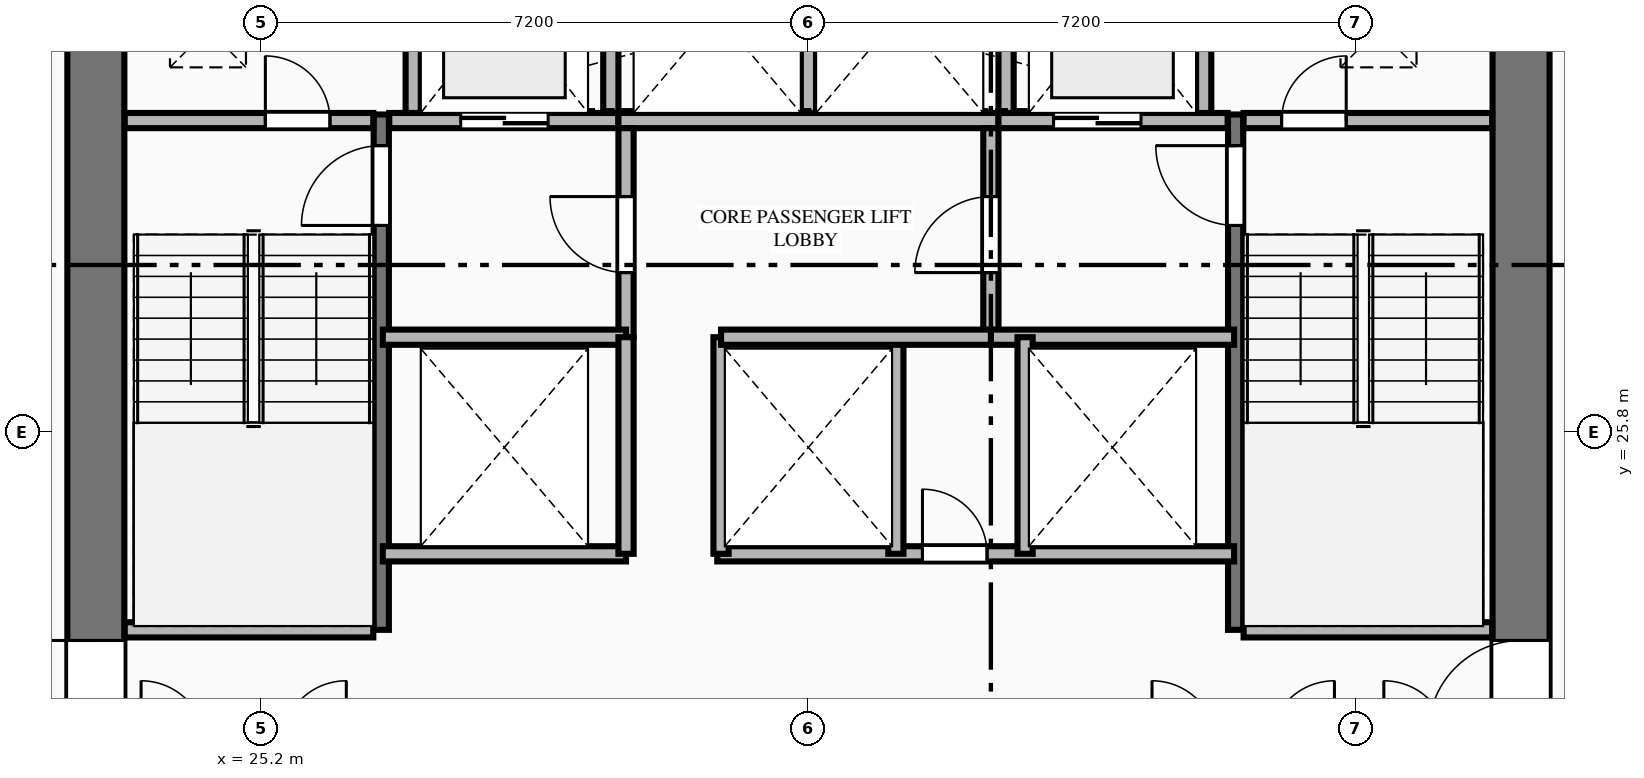
"""IFC4 building model, lengths in metres.
Left out: names, types, materials, properties, quantities, classifications, styles, units other than length and angle.
Written with IfcOpenShell. Run it as: python <this file> out.ifc"""

import sys

from ifc_helpers import new_model, si_unit, direction, frame, frame_2d, origin, place, context, subcontext, project, spatial, rectangle, extrude, element, fill, save


model = new_model("IFC4")
c1 = context("Model", 3, precision=1e-05, world=origin(), true_north=direction((0.0, 1.0)))
c2 = subcontext(c1, "Body", "Model", "MODEL_VIEW")
j1 = project(units=[si_unit("LENGTHUNIT", "METRE"), si_unit("PLANEANGLEUNIT", "RADIAN")], contexts=[c1])
p1 = place(None, origin())
s1 = spatial("IfcSite", under=j1, at=p1, CompositionType="ELEMENT")
p2 = place(p1, origin())
s2 = spatial("IfcBuilding", under=s1, at=p2, CompositionType="ELEMENT")
p3 = place(p2, frame((0.0, 0.0, 80.0)))
s3 = spatial("IfcBuildingStorey", under=s2, at=p3, CompositionType="ELEMENT", Elevation=80.0)
p4 = place(p3, frame((23.025, 18.9, 0.0), z_axis=(0.0, 0.0, 1.0), x_axis=(0.0, 1.0, 0.0)))
e1 = element("IfcWall", 1, at=p4, inside=s3, PredefinedType="SHEAR", context=c2, shape_type="SweptSolid", body=[
    extrude(rectangle(XDim=14.0, YDim=0.75, at=frame_2d((7.0, 0.0))), origin(), (0.0, 0.0, 1.0), 3.33),
])
p5 = place(p4, frame((2.94, 0.0, 0.0)))
e2 = element("IfcOpeningElement", 2, at=p5, cuts=e1, PredefinedType="OPENING", context=c2, shape_type="SweptSolid", body=[
    extrude(rectangle(XDim=1.22, YDim=2.25, at=frame_2d((0.61, 1.125))), frame((0.0, 0.385, 0.0), z_axis=(0.0, -1.0, 0.0), x_axis=(1.0, 0.0, 0.0)), (0.0, 0.0, 1.0), 0.77),
])
p6 = place(p3, frame((41.775, 18.9, 0.0), z_axis=(0.0, 0.0, 1.0), x_axis=(0.0, 1.0, 0.0)))
e3 = element("IfcWall", 3, at=p6, inside=s3, PredefinedType="SHEAR", context=c2, shape_type="SweptSolid", body=[
    extrude(rectangle(XDim=14.0, YDim=0.75, at=frame_2d((7.0, 0.0))), origin(), (0.0, 0.0, 1.0), 3.33),
])
p7 = place(p6, frame((2.94, 0.0, 0.0)))
e4 = element("IfcOpeningElement", 4, at=p7, cuts=e3, PredefinedType="OPENING", context=c2, shape_type="SweptSolid", body=[
    extrude(rectangle(XDim=1.22, YDim=2.25, at=frame_2d((0.61, 1.125))), frame((0.0, 0.385, 0.0), z_axis=(0.0, -1.0, 0.0), x_axis=(1.0, 0.0, 0.0)), (0.0, 0.0, 1.0), 0.77),
])
p8 = place(p3, frame((26.78, 23.2, 0.0), z_axis=(0.0, 0.0, 1.0), x_axis=(0.0, 1.0, 0.0)))
e5 = element("IfcWall", 5, at=p8, inside=s3, PredefinedType="SHEAR", context=c2, shape_type="SweptSolid", body=[
    extrude(rectangle(XDim=6.78, YDim=0.2, at=frame_2d((3.39, 0.0))), origin(), (0.0, 0.0, 1.0), 3.55),
])
p9 = place(p8, frame((5.32, 0.0, 0.0)))
e6 = element("IfcOpeningElement", 6, at=p9, cuts=e5, PredefinedType="OPENING", context=c2, shape_type="SweptSolid", body=[
    extrude(rectangle(XDim=1.05, YDim=2.15, at=frame_2d((0.525, 1.075))), frame((0.0, 0.11, 0.0), z_axis=(0.0, -1.0, 0.0), x_axis=(1.0, 0.0, 0.0)), (0.0, 0.0, 1.0), 0.22),
])
p10 = place(p3, frame((23.405, 23.2, 0.0), z_axis=(0.0, 0.0, 1.0), x_axis=(1.0, 0.0, 0.0)))
e7 = element("IfcWall", 7, at=p10, inside=s3, PredefinedType="PLUMBINGWALL", context=c2, shape_type="SweptSolid", body=[
    extrude(rectangle(XDim=3.27, YDim=0.2, at=frame_2d((1.635, 0.0))), origin(), (0.0, 0.0, 1.0), 3.33),
])
p11 = place(p3, frame((38.02, 23.2, 0.0), z_axis=(0.0, 0.0, 1.0), x_axis=(0.0, 1.0, 0.0)))
e8 = element("IfcWall", 8, at=p11, inside=s3, PredefinedType="SHEAR", context=c2, shape_type="SweptSolid", body=[
    extrude(rectangle(XDim=6.78, YDim=0.2, at=frame_2d((3.39, 0.0))), origin(), (0.0, 0.0, 1.0), 3.55),
])
p12 = place(p11, frame((5.32, 0.0, 0.0)))
e9 = element("IfcOpeningElement", 9, at=p12, cuts=e8, PredefinedType="OPENING", context=c2, shape_type="SweptSolid", body=[
    extrude(rectangle(XDim=1.05, YDim=2.15, at=frame_2d((0.525, 1.075))), frame((0.0, 0.11, 0.0), z_axis=(0.0, -1.0, 0.0), x_axis=(1.0, 0.0, 0.0)), (0.0, 0.0, 1.0), 0.22),
])
p13 = place(p3, frame((38.125, 23.2, 0.0), z_axis=(0.0, 0.0, 1.0), x_axis=(1.0, 0.0, 0.0)))
e10 = element("IfcWall", 10, at=p13, inside=s3, PredefinedType="PLUMBINGWALL", context=c2, shape_type="SweptSolid", body=[
    extrude(rectangle(XDim=3.27, YDim=0.2, at=frame_2d((1.635, 0.0))), origin(), (0.0, 0.0, 1.0), 3.33),
])
p14 = place(p3, frame((23.405, 29.9, 0.0), z_axis=(0.0, 0.0, 1.0), x_axis=(1.0, 0.0, 0.0)))
e11 = element("IfcWall", 11, at=p14, inside=s3, PredefinedType="PLUMBINGWALL", context=c2, shape_type="SweptSolid", body=[
    extrude(rectangle(XDim=3.27, YDim=0.2, at=frame_2d((1.635, 0.0))), origin(), (0.0, 0.0, 1.0), 3.33),
])
p15 = place(p14, frame((1.85, 0.0, 0.0)))
e12 = element("IfcOpeningElement", 12, at=p15, cuts=e11, PredefinedType="OPENING", context=c2, shape_type="SweptSolid", body=[
    extrude(rectangle(XDim=0.85, YDim=2.05, at=frame_2d((0.425, 1.025))), frame((0.0, 0.11, 0.0), z_axis=(0.0, -1.0, 0.0), x_axis=(1.0, 0.0, 0.0)), (0.0, 0.0, 1.0), 0.22),
])
p16 = place(p3, frame((26.885, 29.9, 0.0), z_axis=(0.0, 0.0, 1.0), x_axis=(1.0, 0.0, 0.0)))
e13 = element("IfcWall", 13, at=p16, inside=s3, PredefinedType="PLUMBINGWALL", context=c2, shape_type="SweptSolid", body=[
    extrude(rectangle(XDim=3.015, YDim=0.2, at=frame_2d((1.507, 0.0))), origin(), (0.0, 0.0, 1.0), 3.33),
])
p17 = place(p16, frame((0.94, 0.0, 0.0)))
e14 = element("IfcOpeningElement", 14, at=p17, cuts=e13, PredefinedType="OPENING", context=c2, shape_type="SweptSolid", body=[
    extrude(rectangle(XDim=1.15, YDim=2.2, at=frame_2d((0.575, 1.1))), frame((0.0, 0.11, 0.0), z_axis=(0.0, -1.0, 0.0), x_axis=(1.0, 0.0, 0.0)), (0.0, 0.0, 1.0), 0.22),
])
p18 = place(p3, frame((29.9, 29.9, 0.0), z_axis=(0.0, 0.0, 1.0), x_axis=(1.0, 0.0, 0.0)))
e15 = element("IfcWall", 15, at=p18, inside=s3, PredefinedType="PLUMBINGWALL", context=c2, shape_type="SweptSolid", body=[
    extrude(rectangle(XDim=5.0, YDim=0.2, at=frame_2d((2.5, 0.0))), origin(), (0.0, 0.0, 1.0), 3.33),
])
p19 = place(p3, frame((34.9, 29.9, 0.0), z_axis=(0.0, 0.0, 1.0), x_axis=(1.0, 0.0, 0.0)))
e16 = element("IfcWall", 16, at=p19, inside=s3, PredefinedType="PLUMBINGWALL", context=c2, shape_type="SweptSolid", body=[
    extrude(rectangle(XDim=3.015, YDim=0.2, at=frame_2d((1.508, 0.0))), origin(), (0.0, 0.0, 1.0), 3.33),
])
p20 = place(p19, frame((0.725, 0.0, 0.0)))
e17 = element("IfcOpeningElement", 17, at=p20, cuts=e16, PredefinedType="OPENING", context=c2, shape_type="SweptSolid", body=[
    extrude(rectangle(XDim=1.15, YDim=2.2, at=frame_2d((0.575, 1.1))), frame((0.0, 0.11, 0.0), z_axis=(0.0, -1.0, 0.0), x_axis=(1.0, 0.0, 0.0)), (0.0, 0.0, 1.0), 0.22),
])
p21 = place(p3, frame((38.125, 29.9, 0.0), z_axis=(0.0, 0.0, 1.0), x_axis=(1.0, 0.0, 0.0)))
e18 = element("IfcWall", 18, at=p21, inside=s3, PredefinedType="PLUMBINGWALL", context=c2, shape_type="SweptSolid", body=[
    extrude(rectangle(XDim=3.27, YDim=0.2, at=frame_2d((1.635, 0.0))), origin(), (0.0, 0.0, 1.0), 3.33),
])
p22 = place(p21, frame((0.5, 0.0, 0.0)))
e19 = element("IfcOpeningElement", 19, at=p22, cuts=e18, PredefinedType="OPENING", context=c2, shape_type="SweptSolid", body=[
    extrude(rectangle(XDim=0.85, YDim=2.05, at=frame_2d((0.425, 1.025))), frame((0.0, 0.11, 0.0), z_axis=(0.0, -1.0, 0.0), x_axis=(1.0, 0.0, 0.0)), (0.0, 0.0, 1.0), 0.22),
])
for number, where, z_axis, x_axis in (
    (20, (27.2, 30.0, 0.0), (0.0, 0.0, 1.0), (0.0, 1.0, 0.0)),
    (21, (29.8, 30.0, 0.0), (0.0, 0.0, 1.0), (0.0, 1.0, 0.0)),
    (22, (32.4, 30.0, 0.0), (0.0, 0.0, 1.0), (0.0, 1.0, 0.0)),
    (23, (35.0, 30.0, 0.0), (0.0, 0.0, 1.0), (0.0, 1.0, 0.0)),
    (24, (37.6, 30.0, 0.0), (0.0, 0.0, 1.0), (0.0, 1.0, 0.0)),
):
    element("IfcWall", number, at=place(p3, frame(where, z_axis=z_axis, x_axis=x_axis)), inside=s3, PredefinedType="PLUMBINGWALL", context=c2, shape_type="SweptSolid", body=[
        extrude(rectangle(XDim=2.85, YDim=0.2, at=frame_2d((1.425, 0.0))), origin(), (0.0, 0.0, 1.0), 3.33),
    ])
p23 = place(p3, frame((30.0, 27.05, 0.0), z_axis=(0.0, 0.0, 1.0), x_axis=(0.0, 1.0, 0.0)))
e25 = element("IfcWall", 25, at=p23, inside=s3, PredefinedType="PLUMBINGWALL", context=c2, shape_type="SweptSolid", body=[
    extrude(rectangle(XDim=2.75, YDim=0.2, at=frame_2d((1.375, 0.0))), origin(), (0.0, 0.0, 1.0), 3.33),
])
p24 = place(p23, frame((0.85, 0.0, 0.0)))
e26 = element("IfcOpeningElement", 26, at=p24, cuts=e25, PredefinedType="OPENING", context=c2, shape_type="SweptSolid", body=[
    extrude(rectangle(XDim=1.0, YDim=2.15, at=frame_2d((0.5, 1.075))), frame((0.0, 0.11, 0.0), z_axis=(0.0, -1.0, 0.0), x_axis=(1.0, 0.0, 0.0)), (0.0, 0.0, 1.0), 0.22),
])
p25 = place(p3, frame((26.8, 27.05, 0.0), z_axis=(0.0, 0.0, 1.0), x_axis=(1.0, 0.0, 0.0)))
e27 = element("IfcWall", 27, at=p25, inside=s3, PredefinedType="PLUMBINGWALL", context=c2, shape_type="SweptSolid", body=[
    extrude(rectangle(XDim=3.2, YDim=0.2, at=frame_2d((1.6, 0.0))), origin(), (0.0, 0.0, 1.0), 3.33),
])
p26 = place(p3, frame((34.8, 27.05, 0.0), z_axis=(0.0, 0.0, 1.0), x_axis=(0.0, 1.0, 0.0)))
e28 = element("IfcWall", 28, at=p26, inside=s3, PredefinedType="PLUMBINGWALL", context=c2, shape_type="SweptSolid", body=[
    extrude(rectangle(XDim=2.75, YDim=0.2, at=frame_2d((1.375, 0.0))), origin(), (0.0, 0.0, 1.0), 3.33),
])
p27 = place(p26, frame((0.85, 0.0, 0.0)))
e29 = element("IfcOpeningElement", 29, at=p27, cuts=e28, PredefinedType="OPENING", context=c2, shape_type="SweptSolid", body=[
    extrude(rectangle(XDim=1.0, YDim=2.15, at=frame_2d((0.5, 1.075))), frame((0.0, 0.11, 0.0), z_axis=(0.0, -1.0, 0.0), x_axis=(1.0, 0.0, 0.0)), (0.0, 0.0, 1.0), 0.22),
])
for number, where, z_axis, x_axis in (
    (30, (34.8, 27.05, 0.0), (0.0, 0.0, 1.0), (1.0, 0.0, 0.0)),
    (31, (26.8, 24.2, 0.0), (0.0, 0.0, 1.0), (1.0, 0.0, 0.0)),
):
    element("IfcWall", number, at=place(p3, frame(where, z_axis=z_axis, x_axis=x_axis)), inside=s3, PredefinedType="PLUMBINGWALL", context=c2, shape_type="SweptSolid", body=[
        extrude(rectangle(XDim=3.2, YDim=0.2, at=frame_2d((1.6, 0.0))), origin(), (0.0, 0.0, 1.0), 3.33),
    ])
p28 = place(p3, frame((30.0, 24.2, 0.0), z_axis=(0.0, 0.0, 1.0), x_axis=(0.0, 1.0, 0.0)))
e32 = element("IfcWall", 32, at=p28, inside=s3, PredefinedType="PLUMBINGWALL", context=c2, shape_type="SweptSolid", body=[
    extrude(rectangle(XDim=2.85, YDim=0.2, at=frame_2d((1.425, 0.0))), origin(), (0.0, 0.0, 1.0), 3.33),
])
p29 = place(p3, frame((31.2, 24.2, 0.0), z_axis=(0.0, 0.0, 1.0), x_axis=(1.0, 0.0, 0.0)))
e33 = element("IfcWall", 33, at=p29, inside=s3, PredefinedType="PLUMBINGWALL", context=c2, shape_type="SweptSolid", body=[
    extrude(rectangle(XDim=6.8, YDim=0.2, at=frame_2d((3.4, 0.0))), origin(), (0.0, 0.0, 1.0), 3.33),
])
p30 = place(p29, frame((2.7, 0.0, 0.0)))
e34 = element("IfcOpeningElement", 34, at=p30, cuts=e33, PredefinedType="OPENING", context=c2, shape_type="SweptSolid", body=[
    extrude(rectangle(XDim=0.85, YDim=2.05, at=frame_2d((0.425, 1.025))), frame((0.0, 0.11, 0.0), z_axis=(0.0, -1.0, 0.0), x_axis=(1.0, 0.0, 0.0)), (0.0, 0.0, 1.0), 0.22),
])
for number, where, z_axis, x_axis in (
    (35, (31.25, 24.2, 0.0), (0.0, 0.0, 1.0), (0.0, 1.0, 0.0)),
    (36, (33.55, 24.2, 0.0), (0.0, 0.0, 1.0), (0.0, 1.0, 0.0)),
    (37, (35.25, 24.2, 0.0), (0.0, 0.0, 1.0), (0.0, 1.0, 0.0)),
):
    element("IfcWall", number, at=place(p3, frame(where, z_axis=z_axis, x_axis=x_axis)), inside=s3, PredefinedType="PLUMBINGWALL", context=c2, shape_type="SweptSolid", body=[
        extrude(rectangle(XDim=2.85, YDim=0.2, at=frame_2d((1.425, 0.0))), origin(), (0.0, 0.0, 1.0), 3.33),
    ])
p31 = place(p3, frame((31.25, 27.05, 0.0), z_axis=(0.0, 0.0, 1.0), x_axis=(1.0, 0.0, 0.0)))
e38 = element("IfcWall", 38, at=p31, inside=s3, PredefinedType="PLUMBINGWALL", context=c2, shape_type="SweptSolid", body=[
    extrude(rectangle(XDim=3.55, YDim=0.2, at=frame_2d((1.775, 0.0))), origin(), (0.0, 0.0, 1.0), 3.33),
])
p32 = place(p5, origin())
e39 = element("IfcDoor", 39, at=p32, inside=s3, OperationType="SINGLE_SWING_RIGHT", PredefinedType="DOOR", context=c2, shape_type="SweptSolid", body=[
    extrude(rectangle(XDim=1.22, YDim=2.25, at=frame_2d((0.61, 1.125))), frame((0.0, 0.025, 0.0), z_axis=(0.0, -1.0, 0.0), x_axis=(1.0, 0.0, 0.0)), (0.0, 0.0, 1.0), 0.05),
])
fill(e2, e39)
p33 = place(p7, origin())
e40 = element("IfcDoor", 40, at=p33, inside=s3, OperationType="SINGLE_SWING_LEFT", PredefinedType="DOOR", context=c2, shape_type="SweptSolid", body=[
    extrude(rectangle(XDim=1.22, YDim=2.25, at=frame_2d((0.61, 1.125))), frame((0.0, 0.025, 0.0), z_axis=(0.0, -1.0, 0.0), x_axis=(1.0, 0.0, 0.0)), (0.0, 0.0, 1.0), 0.05),
])
fill(e4, e40)
p34 = place(p9, origin())
e41 = element("IfcDoor", 41, at=p34, inside=s3, OperationType="SINGLE_SWING_LEFT", PredefinedType="DOOR", context=c2, shape_type="SweptSolid", body=[
    extrude(rectangle(XDim=1.05, YDim=2.15, at=frame_2d((0.525, 1.075))), frame((0.0, 0.025, 0.0), z_axis=(0.0, -1.0, 0.0), x_axis=(1.0, 0.0, 0.0)), (0.0, 0.0, 1.0), 0.05),
])
fill(e6, e41)
p35 = place(p12, origin())
e42 = element("IfcDoor", 42, at=p35, inside=s3, OperationType="SINGLE_SWING_RIGHT", PredefinedType="DOOR", context=c2, shape_type="SweptSolid", body=[
    extrude(rectangle(XDim=1.05, YDim=2.15, at=frame_2d((0.525, 1.075))), frame((0.0, 0.025, 0.0), z_axis=(0.0, -1.0, 0.0), x_axis=(1.0, 0.0, 0.0)), (0.0, 0.0, 1.0), 0.05),
])
fill(e9, e42)
p36 = place(p15, origin())
e43 = element("IfcDoor", 43, at=p36, inside=s3, OperationType="SINGLE_SWING_LEFT", PredefinedType="DOOR", context=c2, shape_type="SweptSolid", body=[
    extrude(rectangle(XDim=0.85, YDim=2.05, at=frame_2d((0.425, 1.025))), frame((0.0, 0.025, 0.0), z_axis=(0.0, -1.0, 0.0), x_axis=(1.0, 0.0, 0.0)), (0.0, 0.0, 1.0), 0.05),
])
fill(e12, e43)
p37 = place(p22, origin())
e44 = element("IfcDoor", 44, at=p37, inside=s3, OperationType="SINGLE_SWING_RIGHT", PredefinedType="DOOR", context=c2, shape_type="SweptSolid", body=[
    extrude(rectangle(XDim=0.85, YDim=2.05, at=frame_2d((0.425, 1.025))), frame((0.0, 0.025, 0.0), z_axis=(0.0, -1.0, 0.0), x_axis=(1.0, 0.0, 0.0)), (0.0, 0.0, 1.0), 0.05),
])
fill(e19, e44)
p38 = place(p17, origin())
e45 = element("IfcDoor", 45, at=p38, inside=s3, OperationType="DOUBLE_DOOR_SLIDING", PredefinedType="DOOR", context=c2, shape_type="SweptSolid", body=[
    extrude(rectangle(XDim=1.15, YDim=2.2, at=frame_2d((0.575, 1.1))), frame((0.0, 0.025, 0.0), z_axis=(0.0, -1.0, 0.0), x_axis=(1.0, 0.0, 0.0)), (0.0, 0.0, 1.0), 0.05),
])
fill(e14, e45)
p39 = place(p20, origin())
e46 = element("IfcDoor", 46, at=p39, inside=s3, OperationType="DOUBLE_DOOR_SLIDING", PredefinedType="DOOR", context=c2, shape_type="SweptSolid", body=[
    extrude(rectangle(XDim=1.15, YDim=2.2, at=frame_2d((0.575, 1.1))), frame((0.0, 0.025, 0.0), z_axis=(0.0, -1.0, 0.0), x_axis=(1.0, 0.0, 0.0)), (0.0, 0.0, 1.0), 0.05),
])
fill(e17, e46)
p40 = place(p24, origin())
e47 = element("IfcDoor", 47, at=p40, inside=s3, OperationType="SINGLE_SWING_RIGHT", PredefinedType="DOOR", context=c2, shape_type="SweptSolid", body=[
    extrude(rectangle(XDim=1.0, YDim=2.15, at=frame_2d((0.5, 1.075))), frame((0.0, 0.025, 0.0), z_axis=(0.0, -1.0, 0.0), x_axis=(1.0, 0.0, 0.0)), (0.0, 0.0, 1.0), 0.05),
])
fill(e26, e47)
p41 = place(p27, origin())
e48 = element("IfcDoor", 48, at=p41, inside=s3, OperationType="SINGLE_SWING_LEFT", PredefinedType="DOOR", context=c2, shape_type="SweptSolid", body=[
    extrude(rectangle(XDim=1.0, YDim=2.15, at=frame_2d((0.5, 1.075))), frame((0.0, 0.025, 0.0), z_axis=(0.0, -1.0, 0.0), x_axis=(1.0, 0.0, 0.0)), (0.0, 0.0, 1.0), 0.05),
])
fill(e29, e48)
p42 = place(p30, origin())
e49 = element("IfcDoor", 49, at=p42, inside=s3, OperationType="SINGLE_SWING_LEFT", PredefinedType="DOOR", context=c2, shape_type="SweptSolid", body=[
    extrude(rectangle(XDim=0.85, YDim=2.05, at=frame_2d((0.425, 1.025))), frame((0.0, 0.025, 0.0), z_axis=(0.0, -1.0, 0.0), x_axis=(1.0, 0.0, 0.0)), (0.0, 0.0, 1.0), 0.05),
])
fill(e34, e49)
save(model, sys.argv[1])
